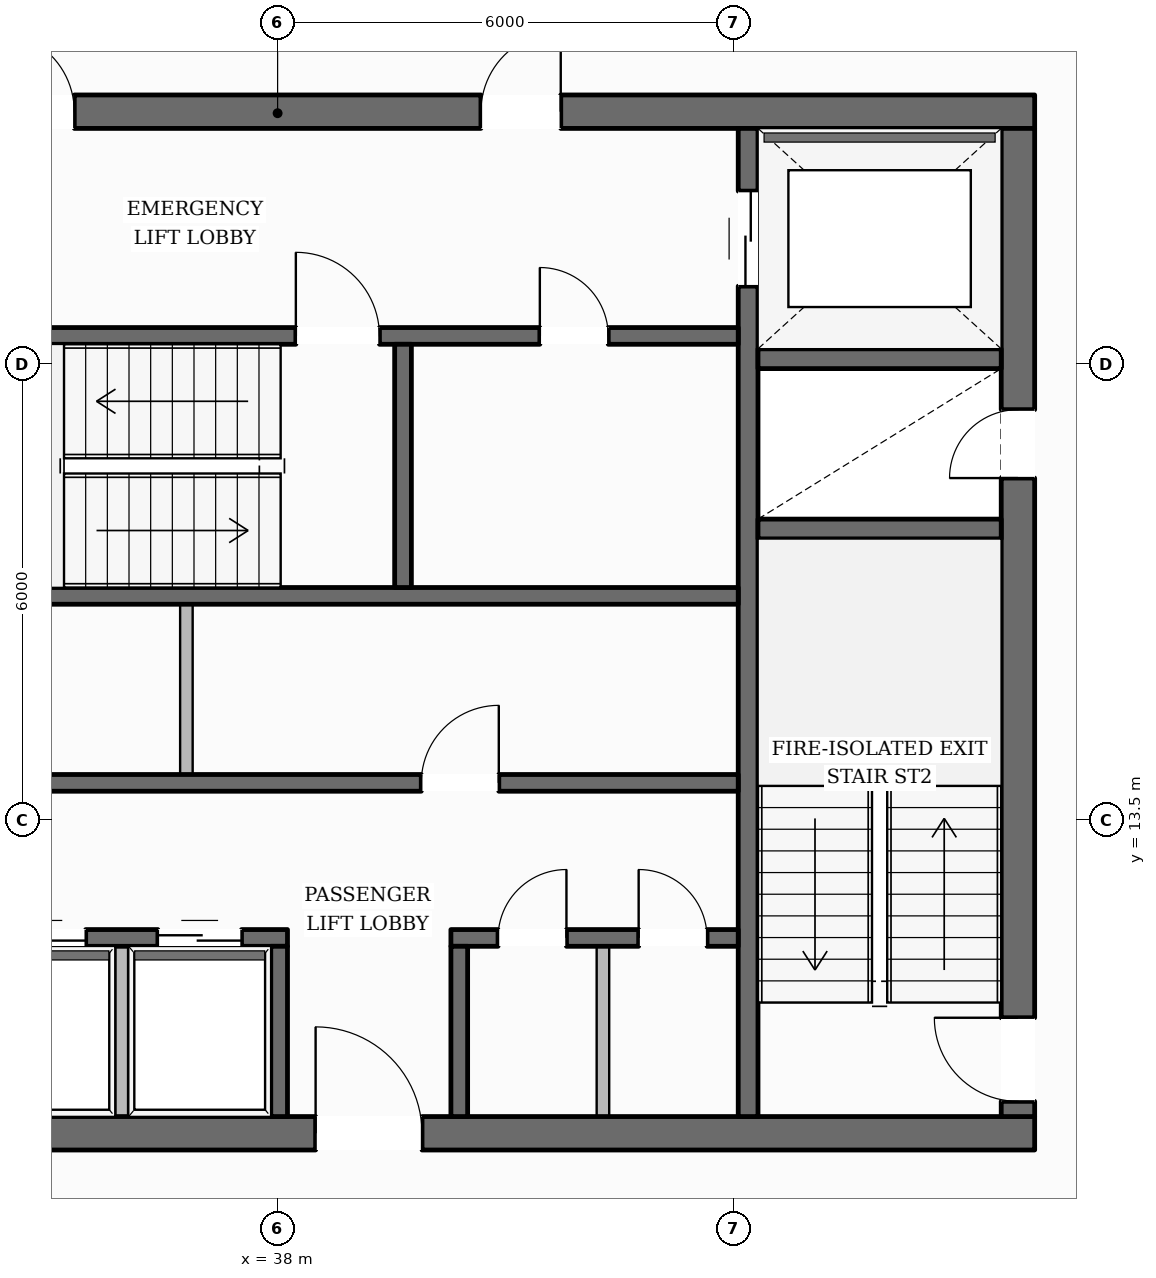
"""IFC4 building model, lengths in metres.
Left out: names, types, materials, properties, quantities, classifications, styles, units other than length and angle.
Written with IfcOpenShell. Run it as: python <this file> out.ifc"""

import sys

from ifc_helpers import new_model, si_unit, direction, frame, frame_2d, origin, place, context, subcontext, project, spatial, rectangle, extrude, element, fill, save


model = new_model("IFC4")
c1 = context("Model", 3, precision=1e-05, world=origin(), true_north=direction((0.0, 1.0)))
c2 = subcontext(c1, "Body", "Model", "MODEL_VIEW")
j1 = project(units=[si_unit("LENGTHUNIT", "METRE"), si_unit("PLANEANGLEUNIT", "RADIAN")], contexts=[c1])
p1 = place(None, origin())
s1 = spatial("IfcSite", under=j1, at=p1, CompositionType="ELEMENT")
p2 = place(p1, origin())
s2 = spatial("IfcBuilding", under=s1, at=p2, CompositionType="ELEMENT")
p3 = place(p2, frame((0.0, 0.0, 191.95)))
s3 = spatial("IfcBuildingStorey", under=s2, at=p3, CompositionType="ELEMENT", Elevation=191.95)
p4 = place(p3, frame((28.04, 9.38, 0.0), z_axis=(0.0, 0.0, 1.0), x_axis=(1.0, 0.0, 0.0)))
e1 = element("IfcWall", 1, at=p4, inside=s3, PredefinedType="SOLIDWALL", context=c2, shape_type="SweptSolid", body=[
    extrude(rectangle(XDim=19.92, YDim=0.44, at=frame_2d((9.96, 0.0))), origin(), (0.0, 0.0, 1.0), 3.6),
])
p5 = place(p4, frame((10.46, 0.0, 0.0)))
e2 = element("IfcOpeningElement", 2, at=p5, cuts=e1, PredefinedType="OPENING", context=c2, shape_type="SweptSolid", body=[
    extrude(rectangle(XDim=1.4, YDim=2.2, at=frame_2d((0.7, 1.1))), frame((0.0, 0.23, 0.0), z_axis=(0.0, -1.0, 0.0), x_axis=(1.0, 0.0, 0.0)), (0.0, 0.0, 1.0), 0.46),
])
p6 = place(p3, frame((28.04, 22.82, 0.0), z_axis=(0.0, 0.0, 1.0), x_axis=(1.0, 0.0, 0.0)))
e3 = element("IfcWall", 3, at=p6, inside=s3, PredefinedType="SOLIDWALL", context=c2, shape_type="SweptSolid", body=[
    extrude(rectangle(XDim=19.92, YDim=0.44, at=frame_2d((9.96, 0.0))), origin(), (0.0, 0.0, 1.0), 3.6),
])
p7 = place(p6, frame((6.235, 0.0, 0.0)))
e4 = element("IfcOpeningElement", 4, at=p7, cuts=e3, PredefinedType="OPENING", context=c2, shape_type="SweptSolid", body=[
    extrude(rectangle(XDim=1.05, YDim=2.15, at=frame_2d((0.525, 1.075))), frame((0.0, 0.23, 0.0), z_axis=(0.0, -1.0, 0.0), x_axis=(1.0, 0.0, 0.0)), (0.0, 0.0, 1.0), 0.46),
])
p8 = place(p6, frame((12.635, 0.0, 0.0)))
e5 = element("IfcOpeningElement", 5, at=p8, cuts=e3, PredefinedType="OPENING", context=c2, shape_type="SweptSolid", body=[
    extrude(rectangle(XDim=1.05, YDim=2.15, at=frame_2d((0.525, 1.075))), frame((0.0, 0.23, 0.0), z_axis=(0.0, -1.0, 0.0), x_axis=(1.0, 0.0, 0.0)), (0.0, 0.0, 1.0), 0.46),
])
p9 = place(p3, frame((47.74, 9.6, 0.0), z_axis=(0.0, 0.0, 1.0), x_axis=(0.0, 1.0, 0.0)))
e6 = element("IfcWall", 6, at=p9, inside=s3, PredefinedType="SOLIDWALL", context=c2, shape_type="SweptSolid", body=[
    extrude(rectangle(XDim=13.0, YDim=0.44, at=frame_2d((6.5, 0.0))), origin(), (0.0, 0.0, 1.0), 3.6),
])
p10 = place(p9, frame((0.2, 0.0, 0.0)))
e7 = element("IfcOpeningElement", 7, at=p10, cuts=e6, PredefinedType="OPENING", context=c2, shape_type="SweptSolid", body=[
    extrude(rectangle(XDim=1.1, YDim=2.15, at=frame_2d((0.55, 1.075))), frame((0.0, 0.23, 0.0), z_axis=(0.0, -1.0, 0.0), x_axis=(1.0, 0.0, 0.0)), (0.0, 0.0, 1.0), 0.46),
])
p11 = place(p9, frame((8.4, 0.0, 0.0)))
e8 = element("IfcOpeningElement", 8, at=p11, cuts=e6, PredefinedType="OPENING", context=c2, shape_type="SweptSolid", body=[
    extrude(rectangle(XDim=0.9, YDim=2.1, at=frame_2d((0.45, 1.05))), frame((0.0, 0.23, 0.0), z_axis=(0.0, -1.0, 0.0), x_axis=(1.0, 0.0, 0.0)), (0.0, 0.0, 1.0), 0.46),
])
p12 = place(p3, frame((44.19, 9.6, 0.0), z_axis=(0.0, 0.0, 1.0), x_axis=(0.0, 1.0, 0.0)))
e9 = element("IfcWall", 9, at=p12, inside=s3, PredefinedType="SHEAR", context=c2, shape_type="SweptSolid", body=[
    extrude(rectangle(XDim=13.0, YDim=0.26, at=frame_2d((6.5, 0.0))), origin(), (0.0, 0.0, 1.0), 3.6),
])
p13 = place(p12, frame((10.925, 0.0, 0.0)))
e10 = element("IfcOpeningElement", 10, at=p13, cuts=e9, PredefinedType="OPENING", context=c2, shape_type="SweptSolid", body=[
    extrude(rectangle(XDim=1.25, YDim=2.25, at=frame_2d((0.625, 1.125))), frame((0.0, 0.14, 0.0), z_axis=(0.0, -1.0, 0.0), x_axis=(1.0, 0.0, 0.0)), (0.0, 0.0, 1.0), 0.28),
])
for number, where, z_axis, x_axis in (
    (11, (44.32, 17.33, 0.0), (0.0, 0.0, 1.0), (1.0, 0.0, 0.0)),
    (12, (44.32, 19.57, 0.0), (0.0, 0.0, 1.0), (1.0, 0.0, 0.0)),
):
    element("IfcWall", number, at=place(p3, frame(where, z_axis=z_axis, x_axis=x_axis)), inside=s3, PredefinedType="SHEAR", context=c2, shape_type="SweptSolid", body=[
        extrude(rectangle(XDim=3.2, YDim=0.26, at=frame_2d((1.6, 0.0))), origin(), (0.0, 0.0, 1.0), 3.6),
    ])
p14 = place(p3, frame((31.94, 19.87, 0.0), z_axis=(0.0, 0.0, 1.0), x_axis=(1.0, 0.0, 0.0)))
e13 = element("IfcWall", 13, at=p14, inside=s3, PredefinedType="SOLIDWALL", context=c2, shape_type="SweptSolid", body=[
    extrude(rectangle(XDim=12.12, YDim=0.22, at=frame_2d((6.06, 0.0))), origin(), (0.0, 0.0, 1.0), 3.6),
])
p15 = place(p14, frame((6.3, 0.0, 0.0)))
e14 = element("IfcOpeningElement", 14, at=p15, cuts=e13, PredefinedType="OPENING", context=c2, shape_type="SweptSolid", body=[
    extrude(rectangle(XDim=1.1, YDim=2.15, at=frame_2d((0.55, 1.075))), frame((0.0, 0.12, 0.0), z_axis=(0.0, -1.0, 0.0), x_axis=(1.0, 0.0, 0.0)), (0.0, 0.0, 1.0), 0.24),
])
p16 = place(p14, frame((9.51, 0.0, 0.0)))
e15 = element("IfcOpeningElement", 15, at=p16, cuts=e13, PredefinedType="OPENING", context=c2, shape_type="SweptSolid", body=[
    extrude(rectangle(XDim=0.9, YDim=2.1, at=frame_2d((0.45, 1.05))), frame((0.0, 0.12, 0.0), z_axis=(0.0, -1.0, 0.0), x_axis=(1.0, 0.0, 0.0)), (0.0, 0.0, 1.0), 0.24),
])
p17 = place(p3, frame((31.94, 16.45, 0.0), z_axis=(0.0, 0.0, 1.0), x_axis=(1.0, 0.0, 0.0)))
e16 = element("IfcWall", 16, at=p17, inside=s3, PredefinedType="SOLIDWALL", context=c2, shape_type="SweptSolid", body=[
    extrude(rectangle(XDim=12.12, YDim=0.22, at=frame_2d((6.06, 0.0))), origin(), (0.0, 0.0, 1.0), 3.6),
])
p18 = place(p3, frame((39.65, 16.56, 0.0), z_axis=(0.0, 0.0, 1.0), x_axis=(0.0, 1.0, 0.0)))
e17 = element("IfcWall", 17, at=p18, inside=s3, PredefinedType="SOLIDWALL", context=c2, shape_type="SweptSolid", body=[
    extrude(rectangle(XDim=3.2, YDim=0.22, at=frame_2d((1.6, 0.0))), origin(), (0.0, 0.0, 1.0), 3.6),
])
p19 = place(p3, frame((31.94, 13.99, 0.0), z_axis=(0.0, 0.0, 1.0), x_axis=(1.0, 0.0, 0.0)))
e18 = element("IfcWall", 18, at=p19, inside=s3, PredefinedType="SOLIDWALL", context=c2, shape_type="SweptSolid", body=[
    extrude(rectangle(XDim=12.12, YDim=0.22, at=frame_2d((6.06, 0.0))), origin(), (0.0, 0.0, 1.0), 3.6),
])
p20 = place(p19, frame((1.91, 0.0, 0.0)))
e19 = element("IfcOpeningElement", 19, at=p20, cuts=e18, PredefinedType="OPENING", context=c2, shape_type="SweptSolid", body=[
    extrude(rectangle(XDim=0.9, YDim=2.1, at=frame_2d((0.45, 1.05))), frame((0.0, 0.12, 0.0), z_axis=(0.0, -1.0, 0.0), x_axis=(1.0, 0.0, 0.0)), (0.0, 0.0, 1.0), 0.24),
])
p21 = place(p19, frame((7.95, 0.0, 0.0)))
e20 = element("IfcOpeningElement", 20, at=p21, cuts=e18, PredefinedType="OPENING", context=c2, shape_type="SweptSolid", body=[
    extrude(rectangle(XDim=1.02, YDim=2.15, at=frame_2d((0.51, 1.075))), frame((0.0, 0.12, 0.0), z_axis=(0.0, -1.0, 0.0), x_axis=(1.0, 0.0, 0.0)), (0.0, 0.0, 1.0), 0.24),
])
p22 = place(p3, frame((31.94, 11.95, 0.0), z_axis=(0.0, 0.0, 1.0), x_axis=(1.0, 0.0, 0.0)))
e21 = element("IfcWall", 21, at=p22, inside=s3, PredefinedType="SOLIDWALL", context=c2, shape_type="SweptSolid", body=[
    extrude(rectangle(XDim=6.19, YDim=0.22, at=frame_2d((3.095, 0.0))), origin(), (0.0, 0.0, 1.0), 3.6),
])
p23 = place(p22, frame((0.385, 0.0, 0.0)))
e22 = element("IfcOpeningElement", 22, at=p23, cuts=e21, PredefinedType="OPENING", context=c2, shape_type="SweptSolid", body=[
    extrude(rectangle(XDim=1.1, YDim=2.2, at=frame_2d((0.55, 1.1))), frame((0.0, 0.12, 0.0), z_axis=(0.0, -1.0, 0.0), x_axis=(1.0, 0.0, 0.0)), (0.0, 0.0, 1.0), 0.24),
])
p24 = place(p22, frame((2.435, 0.0, 0.0)))
e23 = element("IfcOpeningElement", 23, at=p24, cuts=e21, PredefinedType="OPENING", context=c2, shape_type="SweptSolid", body=[
    extrude(rectangle(XDim=1.1, YDim=2.2, at=frame_2d((0.55, 1.1))), frame((0.0, 0.12, 0.0), z_axis=(0.0, -1.0, 0.0), x_axis=(1.0, 0.0, 0.0)), (0.0, 0.0, 1.0), 0.24),
])
p25 = place(p22, frame((4.485, 0.0, 0.0)))
e24 = element("IfcOpeningElement", 24, at=p25, cuts=e21, PredefinedType="OPENING", context=c2, shape_type="SweptSolid", body=[
    extrude(rectangle(XDim=1.1, YDim=2.2, at=frame_2d((0.55, 1.1))), frame((0.0, 0.12, 0.0), z_axis=(0.0, -1.0, 0.0), x_axis=(1.0, 0.0, 0.0)), (0.0, 0.0, 1.0), 0.24),
])
p26 = place(p3, frame((40.28, 11.95, 0.0), z_axis=(0.0, 0.0, 1.0), x_axis=(1.0, 0.0, 0.0)))
e25 = element("IfcWall", 25, at=p26, inside=s3, PredefinedType="SOLIDWALL", context=c2, shape_type="SweptSolid", body=[
    extrude(rectangle(XDim=3.78, YDim=0.22, at=frame_2d((1.89, 0.0))), origin(), (0.0, 0.0, 1.0), 3.6),
])
p27 = place(p26, frame((0.62, 0.0, 0.0)))
e26 = element("IfcOpeningElement", 26, at=p27, cuts=e25, PredefinedType="OPENING", context=c2, shape_type="SweptSolid", body=[
    extrude(rectangle(XDim=0.9, YDim=2.1, at=frame_2d((0.45, 1.05))), frame((0.0, 0.12, 0.0), z_axis=(0.0, -1.0, 0.0), x_axis=(1.0, 0.0, 0.0)), (0.0, 0.0, 1.0), 0.24),
])
p28 = place(p26, frame((2.47, 0.0, 0.0)))
e27 = element("IfcOpeningElement", 27, at=p28, cuts=e25, PredefinedType="OPENING", context=c2, shape_type="SweptSolid", body=[
    extrude(rectangle(XDim=0.9, YDim=2.1, at=frame_2d((0.45, 1.05))), frame((0.0, 0.12, 0.0), z_axis=(0.0, -1.0, 0.0), x_axis=(1.0, 0.0, 0.0)), (0.0, 0.0, 1.0), 0.24),
])
for number, where, z_axis, x_axis in (
    (28, (38.02, 9.6, 0.0), (0.0, 0.0, 1.0), (0.0, 1.0, 0.0)),
    (29, (40.39, 9.6, 0.0), (0.0, 0.0, 1.0), (0.0, 1.0, 0.0)),
):
    element("IfcWall", number, at=place(p3, frame(where, z_axis=z_axis, x_axis=x_axis)), inside=s3, PredefinedType="SOLIDWALL", context=c2, shape_type="SweptSolid", body=[
        extrude(rectangle(XDim=2.24, YDim=0.22, at=frame_2d((1.12, 0.0))), origin(), (0.0, 0.0, 1.0), 3.6),
    ])
p29 = place(p3, frame((42.516, 44.131, 0.0), z_axis=(0.0, 0.0, 1.0), x_axis=(0.506310158323, -0.862351450152, 0.0)))
e30 = element("IfcWall", 30, at=p29, inside=s3, PredefinedType="STANDARD", context=c2, shape_type="SweptSolid", body=[
    extrude(rectangle(XDim=38.0, YDim=0.35, at=frame_2d((19.0, 0.0))), origin(), (0.0, 0.0, 1.0), 3.132),
])
p30 = place(p29, frame((33.708, 0.0, 0.65)))
e31 = element("IfcOpeningElement", 31, at=p30, cuts=e30, PredefinedType="OPENING", context=c2, shape_type="SweptSolid", body=[
    extrude(rectangle(XDim=1.45, YDim=1.75, at=frame_2d((0.725, 0.875))), frame((0.0, 0.185, 0.0), z_axis=(0.0, -1.0, 0.0), x_axis=(1.0, 0.0, 0.0)), (0.0, 0.0, 1.0), 0.37),
])
p31 = place(p29, frame((27.534, 0.0, 0.65)))
e32 = element("IfcOpeningElement", 32, at=p31, cuts=e30, PredefinedType="OPENING", context=c2, shape_type="SweptSolid", body=[
    extrude(rectangle(XDim=1.45, YDim=1.75, at=frame_2d((0.725, 0.875))), frame((0.0, 0.185, 0.0), z_axis=(0.0, -1.0, 0.0), x_axis=(1.0, 0.0, 0.0)), (0.0, 0.0, 1.0), 0.37),
])
p32 = place(p29, frame((21.359, 0.0, 0.65)))
e33 = element("IfcOpeningElement", 33, at=p32, cuts=e30, PredefinedType="OPENING", context=c2, shape_type="SweptSolid", body=[
    extrude(rectangle(XDim=1.45, YDim=1.75, at=frame_2d((0.725, 0.875))), frame((0.0, 0.185, 0.0), z_axis=(0.0, -1.0, 0.0), x_axis=(1.0, 0.0, 0.0)), (0.0, 0.0, 1.0), 0.37),
])
p33 = place(p29, frame((9.009, 0.0, 0.65)))
e34 = element("IfcOpeningElement", 34, at=p33, cuts=e30, PredefinedType="OPENING", context=c2, shape_type="SweptSolid", body=[
    extrude(rectangle(XDim=1.45, YDim=1.75, at=frame_2d((0.725, 0.875))), frame((0.0, 0.185, 0.0), z_axis=(0.0, -1.0, 0.0), x_axis=(1.0, 0.0, 0.0)), (0.0, 0.0, 1.0), 0.37),
])
p34 = place(p29, frame((2.834, 0.0, 0.65)))
e35 = element("IfcOpeningElement", 35, at=p34, cuts=e30, PredefinedType="OPENING", context=c2, shape_type="SweptSolid", body=[
    extrude(rectangle(XDim=1.45, YDim=1.75, at=frame_2d((0.725, 0.875))), frame((0.0, 0.185, 0.0), z_axis=(0.0, -1.0, 0.0), x_axis=(1.0, 0.0, 0.0)), (0.0, 0.0, 1.0), 0.37),
])
p35 = place(p3, frame((35.95, 9.52, 0.0), z_axis=(0.0, 0.0, 1.0), x_axis=(0.0, 1.0, 0.0)))
e36 = element("IfcWall", 36, at=p35, inside=s3, PredefinedType="PARTITIONING", context=c2, shape_type="SweptSolid", body=[
    extrude(rectangle(XDim=2.32, YDim=0.165, at=frame_2d((1.16, 0.0))), origin(), (0.0, 0.0, 1.0), 3.6),
])
p36 = place(p3, frame((36.8, 14.1, 0.0), z_axis=(0.0, 0.0, 1.0), x_axis=(0.0, 1.0, 0.0)))
e37 = element("IfcWall", 37, at=p36, inside=s3, PredefinedType="PARTITIONING", context=c2, shape_type="SweptSolid", body=[
    extrude(rectangle(XDim=2.24, YDim=0.165, at=frame_2d((1.12, 0.0))), origin(), (0.0, 0.0, 1.0), 3.6),
])
p37 = place(p3, frame((42.28, 9.52, 0.0), z_axis=(0.0, 0.0, 1.0), x_axis=(0.0, 1.0, 0.0)))
e38 = element("IfcWall", 38, at=p37, inside=s3, PredefinedType="PARTITIONING", context=c2, shape_type="SweptSolid", body=[
    extrude(rectangle(XDim=2.32, YDim=0.165, at=frame_2d((1.16, 0.0))), origin(), (0.0, 0.0, 1.0), 3.6),
])
p38 = place(p10, origin())
e39 = element("IfcDoor", 39, at=p38, inside=s3, OperationType="SINGLE_SWING_RIGHT", PredefinedType="DOOR", context=c2, shape_type="SweptSolid", body=[
    extrude(rectangle(XDim=1.1, YDim=2.15, at=frame_2d((0.55, 1.075))), frame((0.0, 0.025, 0.0), z_axis=(0.0, -1.0, 0.0), x_axis=(1.0, 0.0, 0.0)), (0.0, 0.0, 1.0), 0.05),
])
fill(e7, e39)
p39 = place(p15, origin())
e40 = element("IfcDoor", 40, at=p39, inside=s3, OperationType="SINGLE_SWING_LEFT", PredefinedType="DOOR", context=c2, shape_type="SweptSolid", body=[
    extrude(rectangle(XDim=1.1, YDim=2.15, at=frame_2d((0.55, 1.075))), frame((0.0, 0.025, 0.0), z_axis=(0.0, -1.0, 0.0), x_axis=(1.0, 0.0, 0.0)), (0.0, 0.0, 1.0), 0.05),
])
fill(e14, e40)
p40 = place(p11, origin())
e41 = element("IfcDoor", 41, at=p40, inside=s3, OperationType="SINGLE_SWING_LEFT", PredefinedType="DOOR", context=c2, shape_type="SweptSolid", body=[
    extrude(rectangle(XDim=0.9, YDim=2.1, at=frame_2d((0.45, 1.05))), frame((0.0, 0.025, 0.0), z_axis=(0.0, -1.0, 0.0), x_axis=(1.0, 0.0, 0.0)), (0.0, 0.0, 1.0), 0.05),
])
fill(e8, e41)
p41 = place(p7, origin())
e42 = element("IfcDoor", 42, at=p41, inside=s3, OperationType="SINGLE_SWING_LEFT", PredefinedType="DOOR", context=c2, shape_type="SweptSolid", body=[
    extrude(rectangle(XDim=1.05, YDim=2.15, at=frame_2d((0.525, 1.075))), frame((0.0, 0.025, 0.0), z_axis=(0.0, -1.0, 0.0), x_axis=(1.0, 0.0, 0.0)), (0.0, 0.0, 1.0), 0.05),
])
fill(e4, e42)
p42 = place(p8, origin())
e43 = element("IfcDoor", 43, at=p42, inside=s3, OperationType="SINGLE_SWING_RIGHT", PredefinedType="DOOR", context=c2, shape_type="SweptSolid", body=[
    extrude(rectangle(XDim=1.05, YDim=2.15, at=frame_2d((0.525, 1.075))), frame((0.0, 0.025, 0.0), z_axis=(0.0, -1.0, 0.0), x_axis=(1.0, 0.0, 0.0)), (0.0, 0.0, 1.0), 0.05),
])
fill(e5, e43)
p43 = place(p13, origin())
e44 = element("IfcDoor", 44, at=p43, inside=s3, OperationType="DOUBLE_DOOR_SLIDING", PredefinedType="DOOR", context=c2, shape_type="SweptSolid", body=[
    extrude(rectangle(XDim=1.25, YDim=2.25, at=frame_2d((0.625, 1.125))), frame((0.0, 0.025, 0.0), z_axis=(0.0, -1.0, 0.0), x_axis=(1.0, 0.0, 0.0)), (0.0, 0.0, 1.0), 0.05),
])
fill(e10, e44)
p44 = place(p5, origin())
e45 = element("IfcDoor", 45, at=p44, inside=s3, OperationType="SINGLE_SWING_LEFT", PredefinedType="DOOR", context=c2, shape_type="SweptSolid", body=[
    extrude(rectangle(XDim=1.4, YDim=2.2, at=frame_2d((0.7, 1.1))), frame((0.0, 0.025, 0.0), z_axis=(0.0, -1.0, 0.0), x_axis=(1.0, 0.0, 0.0)), (0.0, 0.0, 1.0), 0.05),
])
fill(e2, e45)
p45 = place(p24, origin())
e46 = element("IfcDoor", 46, at=p45, inside=s3, OperationType="DOUBLE_DOOR_SLIDING", PredefinedType="DOOR", context=c2, shape_type="SweptSolid", body=[
    extrude(rectangle(XDim=1.1, YDim=2.2, at=frame_2d((0.55, 1.1))), frame((0.0, 0.025, 0.0), z_axis=(0.0, -1.0, 0.0), x_axis=(1.0, 0.0, 0.0)), (0.0, 0.0, 1.0), 0.05),
])
fill(e23, e46)
p46 = place(p25, origin())
e47 = element("IfcDoor", 47, at=p46, inside=s3, OperationType="DOUBLE_DOOR_SLIDING", PredefinedType="DOOR", context=c2, shape_type="SweptSolid", body=[
    extrude(rectangle(XDim=1.1, YDim=2.2, at=frame_2d((0.55, 1.1))), frame((0.0, 0.025, 0.0), z_axis=(0.0, -1.0, 0.0), x_axis=(1.0, 0.0, 0.0)), (0.0, 0.0, 1.0), 0.05),
])
fill(e24, e47)
p47 = place(p21, origin())
e48 = element("IfcDoor", 48, at=p47, inside=s3, OperationType="SINGLE_SWING_RIGHT", PredefinedType="DOOR", context=c2, shape_type="SweptSolid", body=[
    extrude(rectangle(XDim=1.02, YDim=2.15, at=frame_2d((0.51, 1.075))), frame((0.0, 0.025, 0.0), z_axis=(0.0, -1.0, 0.0), x_axis=(1.0, 0.0, 0.0)), (0.0, 0.0, 1.0), 0.05),
])
fill(e20, e48)
p48 = place(p16, origin())
e49 = element("IfcDoor", 49, at=p48, inside=s3, OperationType="SINGLE_SWING_LEFT", PredefinedType="DOOR", context=c2, shape_type="SweptSolid", body=[
    extrude(rectangle(XDim=0.9, YDim=2.1, at=frame_2d((0.45, 1.05))), frame((0.0, 0.025, 0.0), z_axis=(0.0, -1.0, 0.0), x_axis=(1.0, 0.0, 0.0)), (0.0, 0.0, 1.0), 0.05),
])
fill(e15, e49)
p49 = place(p27, origin())
e50 = element("IfcDoor", 50, at=p49, inside=s3, OperationType="SINGLE_SWING_RIGHT", PredefinedType="DOOR", context=c2, shape_type="SweptSolid", body=[
    extrude(rectangle(XDim=0.9, YDim=2.1, at=frame_2d((0.45, 1.05))), frame((0.0, 0.025, 0.0), z_axis=(0.0, -1.0, 0.0), x_axis=(1.0, 0.0, 0.0)), (0.0, 0.0, 1.0), 0.05),
])
fill(e26, e50)
p50 = place(p28, origin())
e51 = element("IfcDoor", 51, at=p50, inside=s3, OperationType="SINGLE_SWING_LEFT", PredefinedType="DOOR", context=c2, shape_type="SweptSolid", body=[
    extrude(rectangle(XDim=0.9, YDim=2.1, at=frame_2d((0.45, 1.05))), frame((0.0, 0.025, 0.0), z_axis=(0.0, -1.0, 0.0), x_axis=(1.0, 0.0, 0.0)), (0.0, 0.0, 1.0), 0.05),
])
fill(e27, e51)
save(model, sys.argv[1])
